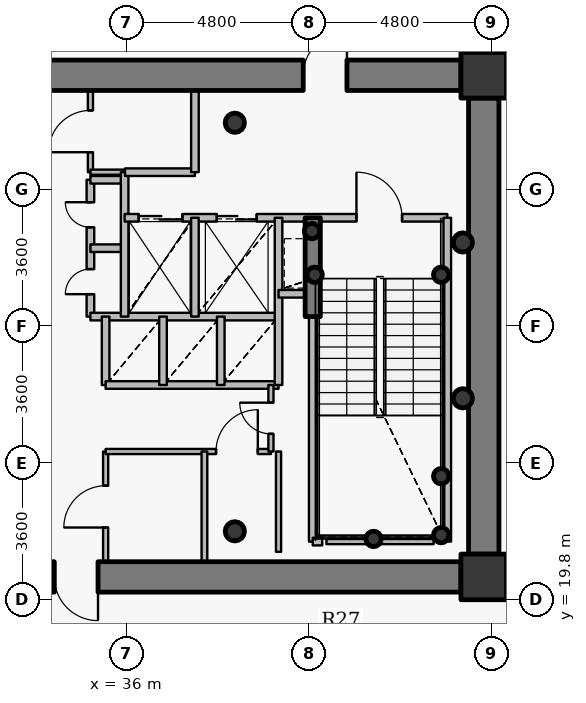
"""IFC4 building model, lengths in metres.
Left out: names, types, materials, properties, quantities, classifications, styles, units other than length and angle.
Written with IfcOpenShell. Run it as: python <this file> out.ifc"""

import sys

from ifc_helpers import new_model, si_unit, direction, frame, frame_2d, origin, origin_2d, place, context, subcontext, project, spatial, rectangle, hollow_circle, extrude, source, transform, mapped, element, fill, save


model = new_model("IFC4")
c1 = context("Model", 3, precision=1e-05, world=origin(), true_north=direction((0.0, 1.0)))
c2 = subcontext(c1, "Body", "Model", "MODEL_VIEW")
j1 = project(units=[si_unit("LENGTHUNIT", "METRE"), si_unit("PLANEANGLEUNIT", "RADIAN")], contexts=[c1])
p1 = place(None, origin())
s1 = spatial("IfcSite", under=j1, at=p1, CompositionType="ELEMENT")
p2 = place(p1, origin())
s2 = spatial("IfcBuilding", under=s1, at=p2, CompositionType="ELEMENT")
p3 = place(p2, frame((0.0, 0.0, 163.65)))
s3 = spatial("IfcBuildingStorey", under=s2, at=p3, CompositionType="ELEMENT", Elevation=163.65)
for number, where, z_axis, x_axis in (
    (1, (45.4, 20.4, 0.0), (0.0, 0.0, 1.0), (1.0, 0.0, 0.0)),
    (2, (45.4, 33.6, 0.0), (0.0, 0.0, 1.0), (1.0, 0.0, 0.0)),
):
    element("IfcColumn", number, at=place(p3, frame(where, z_axis=z_axis, x_axis=x_axis)), inside=s3, PredefinedType="COLUMN", context=c2, shape_type="SweptSolid", body=[
        extrude(rectangle(XDim=1.2, YDim=1.2, at=origin_2d()), origin(), (0.0, 0.0, 1.0), 3.75),
    ])
for number, where, z_axis, x_axis in (
    (3, (38.85, 21.6, 0.0), (0.0, 0.0, 1.0), (1.0, 0.0, 0.0)),
    (4, (38.85, 32.35, 0.0), (0.0, 0.0, 1.0), (1.0, 0.0, 0.0)),
):
    element("IfcColumn", number, at=place(p3, frame(where, z_axis=z_axis, x_axis=x_axis)), inside=s3, PredefinedType="COLUMN", context=c2, shape_type="SweptSolid", body=[
        extrude(hollow_circle(Radius=0.254, WallThickness=0.02, at=origin_2d()), origin(), (0.0, 0.0, 1.0), 3.75),
    ])
for number, where, z_axis, x_axis in (
    (5, (44.28, 21.5, 0.0), (0.0, 0.0, 1.0), (1.0, 0.0, 0.0)),
    (6, (44.28, 23.05, 0.0), (0.0, 0.0, 1.0), (1.0, 0.0, 0.0)),
    (7, (42.5, 21.4, 0.0), (0.0, 0.0, 1.0), (1.0, 0.0, 0.0)),
    (8, (40.95, 28.35, 0.0), (0.0, 0.0, 1.0), (1.0, 0.0, 0.0)),
    (9, (44.28, 28.35, 0.0), (0.0, 0.0, 1.0), (1.0, 0.0, 0.0)),
    (10, (40.88, 29.5, 0.0), (0.0, 0.0, 1.0), (1.0, 0.0, 0.0)),
):
    element("IfcColumn", number, at=place(p3, frame(where, z_axis=z_axis, x_axis=x_axis)), inside=s3, PredefinedType="COLUMN", context=c2, shape_type="SweptSolid", body=[
        extrude(hollow_circle(Radius=0.203, WallThickness=0.016, at=origin_2d()), origin(), (0.0, 0.0, 1.0), 3.75),
    ])
p4 = place(p3, frame((27.2, 33.6, 0.0), z_axis=(0.0, 0.0, 1.0), x_axis=(1.0, 0.0, 0.0)))
e11 = element("IfcWall", 11, at=p4, inside=s3, PredefinedType="SHEAR", context=c2, shape_type="SweptSolid", body=[
    extrude(rectangle(XDim=17.6, YDim=0.8, at=frame_2d((8.8, 0.0))), origin(), (0.0, 0.0, 1.0), 2.95),
])
p5 = place(p4, frame((13.45, 0.0, 0.0)))
e12 = element("IfcOpeningElement", 12, at=p5, cuts=e11, PredefinedType="OPENING", context=c2, shape_type="SweptSolid", body=[
    extrude(rectangle(XDim=1.15, YDim=2.15, at=origin_2d()), frame((0.575, 0.41, 1.075), z_axis=(0.0, -1.0, 0.0), x_axis=(1.0, 0.0, 0.0)), (0.0, 0.0, 1.0), 0.82),
])
p6 = place(p3, frame((45.4, 33.0, 0.0), z_axis=(0.0, 0.0, 1.0), x_axis=(0.0, -1.0, 0.0)))
e13 = element("IfcWall", 13, at=p6, inside=s3, PredefinedType="SHEAR", context=c2, shape_type="SweptSolid", body=[
    extrude(rectangle(XDim=12.0, YDim=0.8, at=frame_2d((6.0, 0.0))), origin(), (0.0, 0.0, 1.0), 2.95),
])
p7 = place(p3, frame((44.8, 20.4, 0.0), z_axis=(0.0, 0.0, 1.0), x_axis=(-1.0, 0.0, 0.0)))
e14 = element("IfcWall", 14, at=p7, inside=s3, PredefinedType="SHEAR", context=c2, shape_type="SweptSolid", body=[
    extrude(rectangle(XDim=17.6, YDim=0.8, at=frame_2d((8.8, 0.0))), origin(), (0.0, 0.0, 1.0), 2.95),
])
p8 = place(p7, frame((9.55, 0.0, 0.0)))
e15 = element("IfcOpeningElement", 15, at=p8, cuts=e14, PredefinedType="OPENING", context=c2, shape_type="SweptSolid", body=[
    extrude(rectangle(XDim=1.15, YDim=2.15, at=origin_2d()), frame((0.575, 0.41, 1.075), z_axis=(0.0, -1.0, 0.0), x_axis=(1.0, 0.0, 0.0)), (0.0, 0.0, 1.0), 0.82),
])
p9 = place(p3, frame((40.9, 27.25, 0.0), z_axis=(0.0, 0.0, 1.0), x_axis=(0.0, 1.0, 0.0)))
e16 = element("IfcWall", 16, at=p9, inside=s3, PredefinedType="SHEAR", context=c2, shape_type="SweptSolid", body=[
    extrude(rectangle(XDim=2.6, YDim=0.4, at=frame_2d((1.3, 0.0))), origin(), (0.0, 0.0, 1.0), 3.1),
])
for number, where, z_axis, x_axis in (
    (17, (44.85, 25.1, 0.0), (0.0, 0.0, 1.0), (1.0, 0.0, 0.0)),
    (18, (44.85, 29.2, 0.0), (0.0, 0.0, 1.0), (1.0, 0.0, 0.0)),
):
    element("IfcColumn", number, at=place(p3, frame(where, z_axis=z_axis, x_axis=x_axis)), inside=s3, PredefinedType="COLUMN", context=c2, shape_type="SweptSolid", body=[
        extrude(hollow_circle(Radius=0.254, WallThickness=0.02, at=origin_2d()), origin(), (0.0, 0.0, 1.0), 3.75),
    ])
p10 = place(p3, frame((35.05, 27.25, 0.0), z_axis=(0.0, 0.0, 1.0), x_axis=(0.0, 1.0, 0.0)))
e19 = element("IfcWall", 19, at=p10, inside=s3, PredefinedType="PARTITIONING", context=c2, shape_type="SweptSolid", body=[
    extrude(rectangle(XDim=3.6, YDim=0.2, at=frame_2d((1.8, 0.0))), origin(), (0.0, 0.0, 1.0), 3.5),
])
p11 = place(p10, frame((0.59, 0.0, 0.0)))
e20 = element("IfcOpeningElement", 20, at=p11, cuts=e19, PredefinedType="OPENING", context=c2, shape_type="SweptSolid", body=[
    extrude(rectangle(XDim=0.66, YDim=2.05, at=origin_2d()), frame((0.33, 0.11, 1.025), z_axis=(0.0, -1.0, 0.0), x_axis=(1.0, 0.0, 0.0)), (0.0, 0.0, 1.0), 0.22),
])
p12 = place(p10, frame((2.35, 0.0, 0.0)))
e21 = element("IfcOpeningElement", 21, at=p12, cuts=e19, PredefinedType="OPENING", context=c2, shape_type="SweptSolid", body=[
    extrude(rectangle(XDim=0.66, YDim=2.05, at=origin_2d()), frame((0.33, 0.11, 1.025), z_axis=(0.0, -1.0, 0.0), x_axis=(1.0, 0.0, 0.0)), (0.0, 0.0, 1.0), 0.22),
])
p13 = place(p3, frame((35.05, 27.25, 0.0), z_axis=(0.0, 0.0, 1.0), x_axis=(1.0, 0.0, 0.0)))
e22 = element("IfcWall", 22, at=p13, inside=s3, PredefinedType="PARTITIONING", context=c2, shape_type="SweptSolid", body=[
    extrude(rectangle(XDim=4.95, YDim=0.2, at=frame_2d((2.475, 0.0))), origin(), (0.0, 0.0, 1.0), 3.085),
])
for number, where, z_axis, x_axis in (
    (23, (35.05, 29.05, 0.0), (0.0, 0.0, 1.0), (1.0, 0.0, 0.0)),
    (24, (35.05, 30.85, 0.0), (0.0, 0.0, 1.0), (1.0, 0.0, 0.0)),
):
    element("IfcWall", number, at=place(p3, frame(where, z_axis=z_axis, x_axis=x_axis)), inside=s3, PredefinedType="PARTITIONING", context=c2, shape_type="SweptSolid", body=[
        extrude(rectangle(XDim=0.9, YDim=0.2, at=frame_2d((0.45, 0.0))), origin(), (0.0, 0.0, 1.0), 3.5),
    ])
p14 = place(p3, frame((35.05, 31.05, 0.0), z_axis=(0.0, 0.0, 1.0), x_axis=(0.0, 1.0, 0.0)))
e25 = element("IfcWall", 25, at=p14, inside=s3, PredefinedType="PARTITIONING", context=c2, shape_type="SweptSolid", body=[
    extrude(rectangle(XDim=2.15, YDim=0.135, at=frame_2d((1.075, 0.0))), origin(), (0.0, 0.0, 1.0), 3.085),
])
p15 = place(p14, frame((0.525, 0.0, 0.0)))
e26 = element("IfcOpeningElement", 26, at=p15, cuts=e25, PredefinedType="OPENING", context=c2, shape_type="SweptSolid", body=[
    extrude(rectangle(XDim=1.1, YDim=2.15, at=origin_2d()), frame((0.55, 0.078, 1.075), z_axis=(0.0, -1.0, 0.0), x_axis=(1.0, 0.0, 0.0)), (0.0, 0.0, 1.0), 0.155),
])
p16 = place(p3, frame((35.05, 31.05, 0.0), z_axis=(0.0, 0.0, 1.0), x_axis=(1.0, 0.0, 0.0)))
e27 = element("IfcWall", 27, at=p16, inside=s3, PredefinedType="PARTITIONING", context=c2, shape_type="SweptSolid", body=[
    extrude(rectangle(XDim=0.9, YDim=0.135, at=frame_2d((0.45, 0.0))), origin(), (0.0, 0.0, 1.0), 3.5),
])
p17 = place(p3, frame((35.45, 20.8, 0.0), z_axis=(0.0, 0.0, 1.0), x_axis=(0.0, 1.0, 0.0)))
e28 = element("IfcWall", 28, at=p17, inside=s3, PredefinedType="PARTITIONING", context=c2, shape_type="SweptSolid", body=[
    extrude(rectangle(XDim=2.9, YDim=0.135, at=frame_2d((1.45, 0.0))), origin(), (0.0, 0.0, 1.0), 3.085),
])
p18 = place(p17, frame((0.9, 0.0, 0.0)))
e29 = element("IfcOpeningElement", 29, at=p18, cuts=e28, PredefinedType="OPENING", context=c2, shape_type="SweptSolid", body=[
    extrude(rectangle(XDim=1.1, YDim=2.15, at=origin_2d()), frame((0.55, 0.078, 1.075), z_axis=(0.0, -1.0, 0.0), x_axis=(1.0, 0.0, 0.0)), (0.0, 0.0, 1.0), 0.155),
])
p19 = place(p3, frame((35.45, 23.7, 0.0), z_axis=(0.0, 0.0, 1.0), x_axis=(1.0, 0.0, 0.0)))
e30 = element("IfcWall", 30, at=p19, inside=s3, PredefinedType="PARTITIONING", context=c2, shape_type="SweptSolid", body=[
    extrude(rectangle(XDim=4.35, YDim=0.135, at=frame_2d((2.175, 0.0))), origin(), (0.0, 0.0, 1.0), 3.085),
])
p20 = place(p19, frame((2.905, 0.0, 0.0)))
e31 = element("IfcOpeningElement", 31, at=p20, cuts=e30, PredefinedType="OPENING", context=c2, shape_type="SweptSolid", body=[
    extrude(rectangle(XDim=1.1, YDim=2.15, at=origin_2d()), frame((0.55, 0.078, 1.075), z_axis=(0.0, -1.0, 0.0), x_axis=(1.0, 0.0, 0.0)), (0.0, 0.0, 1.0), 0.155),
])
p21 = place(p3, frame((35.45, 25.45, 0.0), z_axis=(0.0, 0.0, 1.0), x_axis=(0.0, 1.0, 0.0)))
e32 = element("IfcWall", 32, at=p21, inside=s3, PredefinedType="PARTITIONING", context=c2, shape_type="SweptSolid", body=[
    extrude(rectangle(XDim=1.8, YDim=0.2, at=frame_2d((0.9, 0.0))), origin(), (0.0, 0.0, 1.0), 3.5),
])
p22 = place(p3, frame((35.45, 25.45, 0.0), z_axis=(0.0, 0.0, 1.0), x_axis=(1.0, 0.0, 0.0)))
e33 = element("IfcWall", 33, at=p22, inside=s3, PredefinedType="PARTITIONING", context=c2, shape_type="SweptSolid", body=[
    extrude(rectangle(XDim=4.55, YDim=0.2, at=frame_2d((2.275, 0.0))), origin(), (0.0, 0.0, 1.0), 3.085),
])
p23 = place(p3, frame((35.95, 27.25, 0.0), z_axis=(0.0, 0.0, 1.0), x_axis=(0.0, 1.0, 0.0)))
e34 = element("IfcWall", 34, at=p23, inside=s3, PredefinedType="PARTITIONING", context=c2, shape_type="SweptSolid", body=[
    extrude(rectangle(XDim=3.8, YDim=0.2, at=frame_2d((1.9, 0.0))), origin(), (0.0, 0.0, 1.0), 3.5),
])
p24 = place(p3, frame((35.95, 29.85, 0.0), z_axis=(0.0, 0.0, 1.0), x_axis=(1.0, 0.0, 0.0)))
e35 = element("IfcWall", 35, at=p24, inside=s3, PredefinedType="PARTITIONING", context=c2, shape_type="SweptSolid", body=[
    extrude(rectangle(XDim=8.49, YDim=0.2, at=frame_2d((4.245, 0.0))), origin(), (0.0, 0.0, 1.0), 3.085),
])
p25 = place(p24, frame((6.1, 0.0, 0.0)))
e36 = element("IfcOpeningElement", 36, at=p25, cuts=e35, PredefinedType="OPENING", context=c2, shape_type="SweptSolid", body=[
    extrude(rectangle(XDim=1.2, YDim=2.15, at=origin_2d()), frame((0.6, 0.11, 1.075), z_axis=(0.0, -1.0, 0.0), x_axis=(1.0, 0.0, 0.0)), (0.0, 0.0, 1.0), 0.22),
])
p26 = place(p24, frame((0.37, 0.0, 0.0)))
e37 = element("IfcOpeningElement", 37, at=p26, cuts=e35, PredefinedType="OPENING", context=c2, shape_type="SweptSolid", body=[
    extrude(rectangle(XDim=1.15, YDim=2.15, at=origin_2d()), frame((0.575, 0.11, 1.075), z_axis=(0.0, -1.0, 0.0), x_axis=(1.0, 0.0, 0.0)), (0.0, 0.0, 1.0), 0.22),
])
p27 = place(p24, frame((2.425, 0.0, 0.0)))
e38 = element("IfcOpeningElement", 38, at=p27, cuts=e35, PredefinedType="OPENING", context=c2, shape_type="SweptSolid", body=[
    extrude(rectangle(XDim=1.05, YDim=2.15, at=origin_2d()), frame((0.525, 0.11, 1.075), z_axis=(0.0, -1.0, 0.0), x_axis=(1.0, 0.0, 0.0)), (0.0, 0.0, 1.0), 0.22),
])
p28 = place(p3, frame((35.96, 31.05, 0.0), z_axis=(0.0, 0.0, 1.0), x_axis=(1.0, 0.0, 0.0)))
e39 = element("IfcWall", 39, at=p28, inside=s3, PredefinedType="PARTITIONING", context=c2, shape_type="SweptSolid", body=[
    extrude(rectangle(XDim=1.84, YDim=0.2, at=frame_2d((0.92, 0.0))), origin(), (0.0, 0.0, 1.0), 3.5),
])
p29 = place(p3, frame((36.96, 25.45, 0.0), z_axis=(0.0, 0.0, 1.0), x_axis=(0.0, 1.0, 0.0)))
e40 = element("IfcWall", 40, at=p29, inside=s3, PredefinedType="PARTITIONING", context=c2, shape_type="SweptSolid", body=[
    extrude(rectangle(XDim=1.8, YDim=0.2, at=frame_2d((0.9, 0.0))), origin(), (0.0, 0.0, 1.0), 3.5),
])
p30 = place(p3, frame((37.8, 27.25, 0.0), z_axis=(0.0, 0.0, 1.0), x_axis=(0.0, 1.0, 0.0)))
e41 = element("IfcWall", 41, at=p30, inside=s3, PredefinedType="PARTITIONING", context=c2, shape_type="SweptSolid", body=[
    extrude(rectangle(XDim=2.6, YDim=0.2, at=frame_2d((1.3, 0.0))), origin(), (0.0, 0.0, 1.0), 3.5),
])
p31 = place(p3, frame((37.8, 31.05, 0.0), z_axis=(0.0, 0.0, 1.0), x_axis=(0.0, 1.0, 0.0)))
e42 = element("IfcWall", 42, at=p31, inside=s3, PredefinedType="PARTITIONING", context=c2, shape_type="SweptSolid", body=[
    extrude(rectangle(XDim=2.15, YDim=0.2, at=frame_2d((1.075, 0.0))), origin(), (0.0, 0.0, 1.0), 3.085),
])
p32 = place(p3, frame((38.05, 20.18, 0.0), z_axis=(0.0, 0.0, 1.0), x_axis=(0.0, 1.0, 0.0)))
e43 = element("IfcWall", 43, at=p32, inside=s3, PredefinedType="PARTITIONING", context=c2, shape_type="SweptSolid", body=[
    extrude(rectangle(XDim=3.52, YDim=0.15, at=frame_2d((1.76, 0.0))), origin(), (0.0, 0.0, 1.0), 2.935),
])
p33 = place(p3, frame((38.48, 25.45, 0.0), z_axis=(0.0, 0.0, 1.0), x_axis=(0.0, 1.0, 0.0)))
e44 = element("IfcWall", 44, at=p33, inside=s3, PredefinedType="PARTITIONING", context=c2, shape_type="SweptSolid", body=[
    extrude(rectangle(XDim=1.8, YDim=0.2, at=frame_2d((0.9, 0.0))), origin(), (0.0, 0.0, 1.0), 3.5),
])
p34 = place(p3, frame((39.8, 23.7, 0.0), z_axis=(0.0, 0.0, 1.0), x_axis=(0.0, 1.0, 0.0)))
e45 = element("IfcWall", 45, at=p34, inside=s3, PredefinedType="PARTITIONING", context=c2, shape_type="SweptSolid", body=[
    extrude(rectangle(XDim=1.75, YDim=0.135, at=frame_2d((0.875, 0.0))), origin(), (0.0, 0.0, 1.0), 3.5),
])
p35 = place(p34, frame((0.465, 0.0, 0.0)))
e46 = element("IfcOpeningElement", 46, at=p35, cuts=e45, PredefinedType="OPENING", context=c2, shape_type="SweptSolid", body=[
    extrude(rectangle(XDim=0.82, YDim=2.1, at=origin_2d()), frame((0.41, 0.078, 1.05), z_axis=(0.0, -1.0, 0.0), x_axis=(1.0, 0.0, 0.0)), (0.0, 0.0, 1.0), 0.155),
])
p36 = place(p3, frame((40.0, 25.45, 0.0), z_axis=(0.0, 0.0, 1.0), x_axis=(0.0, 1.0, 0.0)))
e47 = element("IfcWall", 47, at=p36, inside=s3, PredefinedType="PARTITIONING", context=c2, shape_type="SweptSolid", body=[
    extrude(rectangle(XDim=4.4, YDim=0.2, at=frame_2d((2.2, 0.0))), origin(), (0.0, 0.0, 1.0), 3.5),
])
p37 = place(p3, frame((40.0, 27.85, 0.0), z_axis=(0.0, 0.0, 1.0), x_axis=(1.0, 0.0, 0.0)))
e48 = element("IfcWall", 48, at=p37, inside=s3, PredefinedType="PARTITIONING", context=c2, shape_type="SweptSolid", body=[
    extrude(rectangle(XDim=0.9, YDim=0.2, at=frame_2d((0.45, 0.0))), origin(), (0.0, 0.0, 1.0), 3.5),
])
p38 = place(p3, frame((40.9, 21.33, 0.0), z_axis=(0.0, 0.0, 1.0), x_axis=(0.0, 1.0, 0.0)))
e49 = element("IfcWall", 49, at=p38, inside=s3, PredefinedType="PARTITIONING", context=c2, shape_type="SweptSolid", body=[
    extrude(rectangle(XDim=5.91, YDim=0.2, at=frame_2d((2.955, 0.0))), origin(), (0.0, 0.0, 1.0), 3.035),
])
p39 = place(p3, frame((40.9, 21.33, 0.0), z_axis=(0.0, 0.0, 1.0), x_axis=(1.0, 0.0, 0.0)))
e50 = element("IfcWall", 50, at=p39, inside=s3, PredefinedType="PARTITIONING", context=c2, shape_type="SweptSolid", body=[
    extrude(rectangle(XDim=0.25, YDim=0.2, at=frame_2d((0.125, 0.0))), origin(), (0.0, 0.0, 1.0), 3.035),
])
p40 = place(p3, frame((44.44, 21.33, 0.0), z_axis=(0.0, 0.0, 1.0), x_axis=(0.0, 1.0, 0.0)))
e51 = element("IfcWall", 51, at=p40, inside=s3, PredefinedType="PARTITIONING", context=c2, shape_type="SweptSolid", body=[
    extrude(rectangle(XDim=8.52, YDim=0.2, at=frame_2d((4.26, 0.0))), origin(), (0.0, 0.0, 1.0), 3.5),
])
p41 = place(p3, frame((44.08, 21.33, 0.0), z_axis=(0.0, 0.0, 1.0), x_axis=(-1.0, 0.0, 0.0)))
e52 = element("IfcWall", 52, at=p41, inside=s3, PredefinedType="PARTITIONING", context=c2, shape_type="SweptSolid", body=[
    extrude(rectangle(XDim=2.82, YDim=0.135, at=frame_2d((1.41, 0.0))), origin(), (0.0, 0.0, 1.0), 3.035),
])
p42 = place(p3, frame((40.0, 23.7, 0.0), z_axis=(0.0, 0.0, 1.0), x_axis=(0.0, -1.0, 0.0)))
e53 = element("IfcWall", 53, at=p42, inside=s3, PredefinedType="PARTITIONING", context=c2, shape_type="SweptSolid", body=[
    extrude(rectangle(XDim=2.64, YDim=0.135, at=frame_2d((1.32, 0.0))), origin(), (0.0, 0.0, 1.0), 3.035),
])
for number, where, z_axis, x_axis in (
    (54, (45.8, 34.0, 0.0), (0.0, 0.0, 1.0), (-1.0, 0.0, 0.0)),
    (55, (44.81, 20.0, 0.0), (0.0, 0.0, 1.0), (1.0, 0.0, 0.0)),
):
    element("IfcWall", number, at=place(p3, frame(where, z_axis=z_axis, x_axis=x_axis)), inside=s3, PredefinedType="PARTITIONING", context=c2, shape_type="SweptSolid", body=[
        extrude(rectangle(XDim=0.99, YDim=0.135, at=frame_2d((0.495, 0.0))), origin(), (0.0, 0.0, 1.0), 2.935),
    ])
p43 = place(p3, frame((45.81, 20.05, 0.0), z_axis=(0.0, 0.0, 1.0), x_axis=(1.0, 0.0, 0.0)))
e56 = element("IfcWall", 56, at=p43, inside=s3, PredefinedType="PARTITIONING", context=c2, shape_type="SweptSolid", body=[
    extrude(rectangle(XDim=0.465, YDim=0.135, at=frame_2d((0.232, 0.0))), origin(), (0.0, 0.0, 1.0), 3.5),
])
p44 = place(p3, frame((45.8, 33.01, 0.0), z_axis=(0.0, 0.0, 1.0), x_axis=(0.0, 1.0, 0.0)))
e57 = element("IfcWall", 57, at=p44, inside=s3, PredefinedType="PARTITIONING", context=c2, shape_type="SweptSolid", body=[
    extrude(rectangle(XDim=0.682, YDim=0.15, at=frame_2d((0.341, 0.0))), origin(), (0.0, 0.0, 1.0), 3.5),
])
p45 = place(p3, frame((45.8, 33.767, 0.0), z_axis=(0.0, 0.0, 1.0), x_axis=(0.823065918238, 0.56794585502, 0.0)))
e58 = element("IfcWall", 58, at=p45, inside=s3, PredefinedType="PARTITIONING", context=c2, shape_type="SweptSolid", body=[
    extrude(rectangle(XDim=0.322, YDim=0.15, at=frame_2d((0.161, 0.0))), origin(), (0.0, 0.0, 1.0), 3.5),
])
p46 = place(p3, frame((45.8, 20.378, 0.0), z_axis=(0.0, 0.0, 1.0), x_axis=(0.0, 1.0, 0.0)))
e59 = element("IfcWall", 59, at=p46, inside=s3, PredefinedType="PARTITIONING", context=c2, shape_type="SweptSolid", body=[
    extrude(rectangle(XDim=0.612, YDim=0.135, at=frame_2d((0.306, 0.0))), origin(), (0.0, 0.0, 1.0), 3.5),
])
m1 = source(origin(), c2, "Body", "SweptSolid", [
    extrude(rectangle(XDim=1.15, YDim=2.15, at=origin_2d()), frame((0.575, 0.025, 1.075), z_axis=(0.0, -1.0, 0.0), x_axis=(1.0, 0.0, 0.0)), (0.0, 0.0, 1.0), 0.05),
])
p47 = place(p5, origin())
e60 = element("IfcDoor", 60, at=p47, inside=s3, OperationType="SINGLE_SWING_RIGHT", PredefinedType="DOOR", context=c2, shape_type="MappedRepresentation", body=[
    mapped(m1, transform((0.0, 0.0, 0.0), x_axis=(1.0, 0.0, 0.0), y_axis=(0.0, 1.0, 0.0), z_axis=(0.0, 0.0, 1.0), scale=1.0)),
])
fill(e12, e60)
p48 = place(p8, origin())
e61 = element("IfcDoor", 61, at=p48, inside=s3, OperationType="SINGLE_SWING_LEFT", PredefinedType="DOOR", context=c2, shape_type="MappedRepresentation", body=[
    mapped(m1, transform((0.0, 0.0, 0.0), x_axis=(1.0, 0.0, 0.0), y_axis=(0.0, 1.0, 0.0), z_axis=(0.0, 0.0, 1.0), scale=1.0)),
])
fill(e15, e61)
m2 = source(origin(), c2, "Body", "SweptSolid", [
    extrude(rectangle(XDim=1.2, YDim=2.15, at=origin_2d()), frame((0.6, 0.025, 1.075), z_axis=(0.0, -1.0, 0.0), x_axis=(1.0, 0.0, 0.0)), (0.0, 0.0, 1.0), 0.05),
])
p49 = place(p25, origin())
e62 = element("IfcDoor", 62, at=p49, inside=s3, OperationType="SINGLE_SWING_LEFT", PredefinedType="DOOR", context=c2, shape_type="MappedRepresentation", body=[
    mapped(m2, transform((0.0, 0.0, 0.0), x_axis=(1.0, 0.0, 0.0), y_axis=(0.0, 1.0, 0.0), z_axis=(0.0, 0.0, 1.0), scale=1.0)),
])
fill(e36, e62)
m3 = source(origin(), c2, "Body", "SweptSolid", [
    extrude(rectangle(XDim=1.15, YDim=2.15, at=origin_2d()), frame((0.575, 0.025, 1.075), z_axis=(0.0, -1.0, 0.0), x_axis=(1.0, 0.0, 0.0)), (0.0, 0.0, 1.0), 0.05),
])
p50 = place(p26, origin())
e63 = element("IfcDoor", 63, at=p50, inside=s3, OperationType="DOUBLE_DOOR_SLIDING", PredefinedType="USERDEFINED", context=c2, shape_type="MappedRepresentation", body=[
    mapped(m3, transform((0.0, 0.0, 0.0), x_axis=(1.0, 0.0, 0.0), y_axis=(0.0, 1.0, 0.0), z_axis=(0.0, 0.0, 1.0), scale=1.0)),
])
fill(e37, e63)
m4 = source(origin(), c2, "Body", "SweptSolid", [
    extrude(rectangle(XDim=1.05, YDim=2.15, at=origin_2d()), frame((0.525, 0.025, 1.075), z_axis=(0.0, -1.0, 0.0), x_axis=(1.0, 0.0, 0.0)), (0.0, 0.0, 1.0), 0.05),
])
p51 = place(p27, origin())
e64 = element("IfcDoor", 64, at=p51, inside=s3, OperationType="DOUBLE_DOOR_SLIDING", PredefinedType="USERDEFINED", context=c2, shape_type="MappedRepresentation", body=[
    mapped(m4, transform((0.0, 0.0, 0.0), x_axis=(1.0, 0.0, 0.0), y_axis=(0.0, 1.0, 0.0), z_axis=(0.0, 0.0, 1.0), scale=1.0)),
])
fill(e38, e64)
m5 = source(origin(), c2, "Body", "SweptSolid", [
    extrude(rectangle(XDim=0.66, YDim=2.05, at=origin_2d()), frame((0.33, 0.025, 1.025), z_axis=(0.0, -1.0, 0.0), x_axis=(1.0, 0.0, 0.0)), (0.0, 0.0, 1.0), 0.05),
])
p52 = place(p11, origin())
e65 = element("IfcDoor", 65, at=p52, inside=s3, OperationType="SINGLE_SWING_LEFT", PredefinedType="USERDEFINED", context=c2, shape_type="MappedRepresentation", body=[
    mapped(m5, transform((0.0, 0.0, 0.0), x_axis=(1.0, 0.0, 0.0), y_axis=(0.0, 1.0, 0.0), z_axis=(0.0, 0.0, 1.0), scale=1.0)),
])
fill(e20, e65)
p53 = place(p12, origin())
e66 = element("IfcDoor", 66, at=p53, inside=s3, OperationType="SINGLE_SWING_RIGHT", PredefinedType="USERDEFINED", context=c2, shape_type="MappedRepresentation", body=[
    mapped(m5, transform((0.0, 0.0, 0.0), x_axis=(1.0, 0.0, 0.0), y_axis=(0.0, 1.0, 0.0), z_axis=(0.0, 0.0, 1.0), scale=1.0)),
])
fill(e21, e66)
m6 = source(origin(), c2, "Body", "SweptSolid", [
    extrude(rectangle(XDim=1.1, YDim=2.15, at=origin_2d()), frame((0.55, 0.025, 1.075), z_axis=(0.0, -1.0, 0.0), x_axis=(1.0, 0.0, 0.0)), (0.0, 0.0, 1.0), 0.05),
])
p54 = place(p18, origin())
e67 = element("IfcDoor", 67, at=p54, inside=s3, OperationType="SINGLE_SWING_LEFT", PredefinedType="DOOR", context=c2, shape_type="MappedRepresentation", body=[
    mapped(m6, transform((0.0, 0.0, 0.0), x_axis=(1.0, 0.0, 0.0), y_axis=(0.0, 1.0, 0.0), z_axis=(0.0, 0.0, 1.0), scale=1.0)),
])
fill(e29, e67)
p55 = place(p20, origin())
e68 = element("IfcDoor", 68, at=p55, inside=s3, OperationType="SINGLE_SWING_RIGHT", PredefinedType="DOOR", context=c2, shape_type="MappedRepresentation", body=[
    mapped(m6, transform((0.0, 0.0, 0.0), x_axis=(1.0, 0.0, 0.0), y_axis=(0.0, 1.0, 0.0), z_axis=(0.0, 0.0, 1.0), scale=1.0)),
])
fill(e31, e68)
p56 = place(p15, origin())
e69 = element("IfcDoor", 69, at=p56, inside=s3, OperationType="SINGLE_SWING_LEFT", PredefinedType="DOOR", context=c2, shape_type="MappedRepresentation", body=[
    mapped(m6, transform((0.0, 0.0, 0.0), x_axis=(1.0, 0.0, 0.0), y_axis=(0.0, 1.0, 0.0), z_axis=(0.0, 0.0, 1.0), scale=1.0)),
])
fill(e26, e69)
m7 = source(origin(), c2, "Body", "SweptSolid", [
    extrude(rectangle(XDim=0.82, YDim=2.1, at=origin_2d()), frame((0.41, 0.025, 1.05), z_axis=(0.0, -1.0, 0.0), x_axis=(1.0, 0.0, 0.0)), (0.0, 0.0, 1.0), 0.05),
])
p57 = place(p35, origin())
e70 = element("IfcDoor", 70, at=p57, inside=s3, OperationType="SINGLE_SWING_RIGHT", PredefinedType="DOOR", context=c2, shape_type="MappedRepresentation", body=[
    mapped(m7, transform((0.0, 0.0, 0.0), x_axis=(1.0, 0.0, 0.0), y_axis=(0.0, 1.0, 0.0), z_axis=(0.0, 0.0, 1.0), scale=1.0)),
])
fill(e46, e70)
save(model, sys.argv[1])
